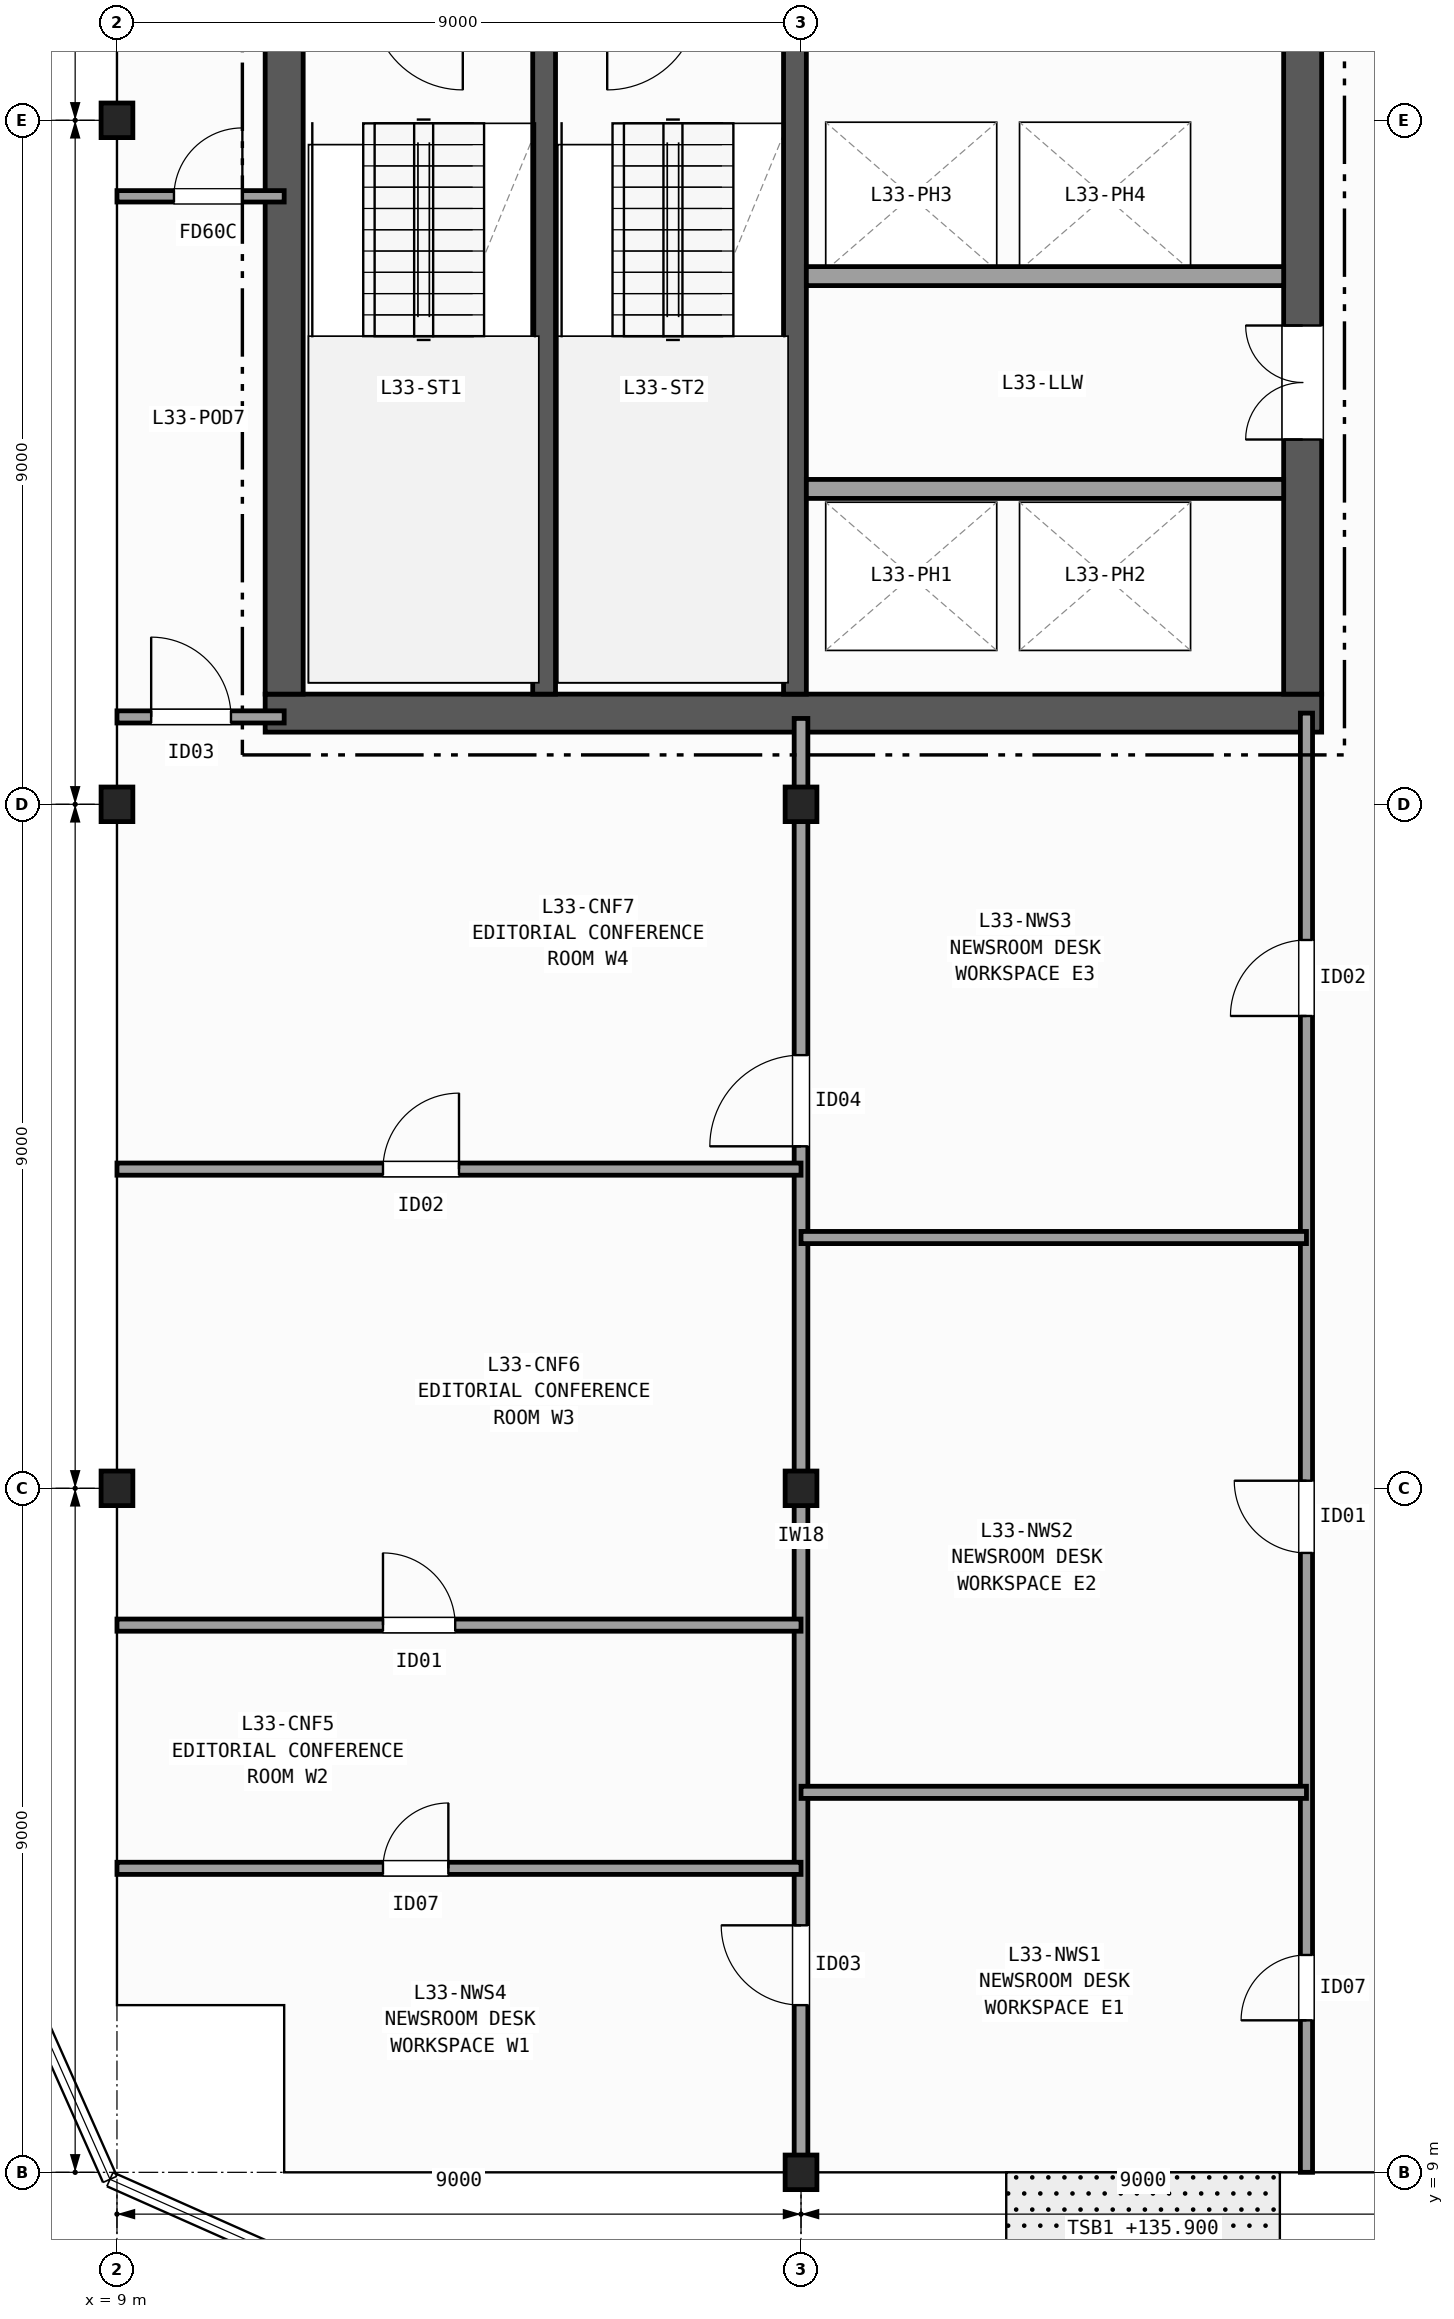
"""IFC4 building model, lengths in metres.
Left out: names, types, materials, properties, quantities, classifications, styles, units other than length and angle.
Written with IfcOpenShell. Run it as: python <this file> out.ifc"""

import sys

from ifc_helpers import new_model, si_unit, direction, frame, frame_2d, origin, origin_2d, place, context, subcontext, project, spatial, rectangle, i_section, extrude, element, fill, save


model = new_model("IFC4")
c1 = context("Model", 3, precision=1e-05, world=origin(), true_north=direction((0.0, 1.0)))
c2 = subcontext(c1, "Body", "Model", "MODEL_VIEW")
j1 = project(units=[si_unit("LENGTHUNIT", "METRE"), si_unit("PLANEANGLEUNIT", "RADIAN")], contexts=[c1])
p1 = place(None, origin())
s1 = spatial("IfcSite", under=j1, at=p1, CompositionType="ELEMENT")
p2 = place(p1, origin())
s2 = spatial("IfcBuilding", under=s1, at=p2, CompositionType="ELEMENT")
p3 = place(p2, frame((0.0, 0.0, 135.9)))
s3 = spatial("IfcBuildingStorey", under=s2, at=p3, CompositionType="ELEMENT", Elevation=135.9)
for number, where, z_axis, x_axis in (
    (1, (9.0, 18.0, 0.0), (0.0, 0.0, 1.0), (1.0, 0.0, 0.0)),
    (2, (9.0, 27.0, 0.0), (0.0, 0.0, 1.0), (1.0, 0.0, 0.0)),
    (3, (9.0, 36.0, 0.0), (0.0, 0.0, 1.0), (1.0, 0.0, 0.0)),
    (4, (18.0, 9.0, 0.0), (0.0, 0.0, 1.0), (1.0, 0.0, 0.0)),
    (5, (18.0, 18.0, 0.0), (0.0, 0.0, 1.0), (1.0, 0.0, 0.0)),
    (6, (18.0, 27.0, 0.0), (0.0, 0.0, 1.0), (1.0, 0.0, 0.0)),
):
    element("IfcColumn", number, at=place(p3, frame(where, z_axis=z_axis, x_axis=x_axis)), inside=s3, PredefinedType="COLUMN", context=c2, shape_type="SweptSolid", body=[
        extrude(i_section(OverallWidth=0.418, OverallDepth=0.455, WebThickness=0.042, FlangeThickness=0.068, FilletRadius=0.015, at=origin_2d()), origin(), (0.0, 0.0, 1.0), 3.7),
    ])
p4 = place(p3, frame((10.95, 28.2, 0.0), z_axis=(0.0, 0.0, 1.0), x_axis=(1.0, 0.0, 0.0)))
e7 = element("IfcWall", 7, at=p4, inside=s3, PredefinedType="SHEAR", context=c2, shape_type="SweptSolid", body=[
    extrude(rectangle(XDim=13.9, YDim=0.5, at=frame_2d((6.95, 0.0))), origin(), (0.0, 0.0, 1.0), 3.42),
])
p5 = place(p3, frame((11.2, 42.15, 0.0), z_axis=(0.0, 0.0, 1.0), x_axis=(0.0, -1.0, 0.0)))
e8 = element("IfcWall", 8, at=p5, inside=s3, PredefinedType="SHEAR", context=c2, shape_type="SweptSolid", body=[
    extrude(rectangle(XDim=13.7, YDim=0.5, at=frame_2d((6.85, 0.0))), origin(), (0.0, 0.0, 1.0), 3.42),
])
p6 = place(p3, frame((24.6, 28.45, 0.0), z_axis=(0.0, 0.0, 1.0), x_axis=(0.0, 1.0, 0.0)))
e9 = element("IfcWall", 9, at=p6, inside=s3, PredefinedType="SHEAR", context=c2, shape_type="SweptSolid", body=[
    extrude(rectangle(XDim=13.7, YDim=0.5, at=frame_2d((6.85, 0.0))), origin(), (0.0, 0.0, 1.0), 3.42),
])
p7 = place(p6, frame((3.35, 0.0, 0.0)))
e10 = element("IfcOpeningElement", 10, at=p7, cuts=e9, PredefinedType="OPENING", context=c2, shape_type="SweptSolid", body=[
    extrude(rectangle(XDim=1.5, YDim=2.2, at=frame_2d((0.75, 1.1))), frame((0.0, 0.26, 0.0), z_axis=(0.0, -1.0, 0.0), x_axis=(1.0, 0.0, 0.0)), (0.0, 0.0, 1.0), 0.52),
])
p8 = place(p6, frame((9.95, 0.0, 0.0)))
e11 = element("IfcOpeningElement", 11, at=p8, cuts=e9, PredefinedType="OPENING", context=c2, shape_type="SweptSolid", body=[
    extrude(rectangle(XDim=0.9, YDim=2.1, at=frame_2d((0.45, 1.05))), frame((0.0, 0.26, 0.0), z_axis=(0.0, -1.0, 0.0), x_axis=(1.0, 0.0, 0.0)), (0.0, 0.0, 1.0), 0.52),
])
p9 = place(p3, frame((14.62, 28.45, 0.0), z_axis=(0.0, 0.0, 1.0), x_axis=(0.0, 1.0, 0.0)))
e12 = element("IfcWall", 12, at=p9, inside=s3, PredefinedType="SHEAR", context=c2, shape_type="SweptSolid", body=[
    extrude(rectangle(XDim=9.0, YDim=0.3, at=frame_2d((4.5, 0.0))), origin(), (0.0, 0.0, 1.0), 3.42),
])
p10 = place(p3, frame((17.92, 42.15, 0.0), z_axis=(0.0, 0.0, 1.0), x_axis=(0.0, -1.0, 0.0)))
e13 = element("IfcWall", 13, at=p10, inside=s3, PredefinedType="SHEAR", context=c2, shape_type="SweptSolid", body=[
    extrude(rectangle(XDim=13.7, YDim=0.3, at=frame_2d((6.85, 0.0))), origin(), (0.0, 0.0, 1.0), 3.42),
])
p11 = place(p10, frame((1.975, 0.0, 0.0)))
e14 = element("IfcOpeningElement", 14, at=p11, cuts=e13, PredefinedType="OPENING", context=c2, shape_type="SweptSolid", body=[
    extrude(rectangle(XDim=1.15, YDim=2.15, at=frame_2d((0.575, 1.075))), frame((0.0, 0.16, 0.0), z_axis=(0.0, -1.0, 0.0), x_axis=(1.0, 0.0, 0.0)), (0.0, 0.0, 1.0), 0.32),
])
for number, where, z_axis, x_axis in (
    (15, (18.07, 31.15, 0.0), (0.0, 0.0, 1.0), (1.0, 0.0, 0.0)),
    (16, (24.35, 33.95, 0.0), (0.0, 0.0, 1.0), (-1.0, 0.0, 0.0)),
):
    element("IfcWall", number, at=place(p3, frame(where, z_axis=z_axis, x_axis=x_axis)), inside=s3, PredefinedType="PARTITIONING", context=c2, shape_type="SweptSolid", body=[
        extrude(rectangle(XDim=6.28, YDim=0.25, at=frame_2d((3.14, 0.0))), origin(), (0.0, 0.0, 1.0), 3.42),
    ])
p12 = place(p3, frame((9.0, 28.15, 0.0), z_axis=(0.0, 0.0, 1.0), x_axis=(1.0, 0.0, 0.0)))
e17 = element("IfcWall", 17, at=p12, inside=s3, PredefinedType="PARTITIONING", context=c2, shape_type="SweptSolid", body=[
    extrude(rectangle(XDim=2.2, YDim=0.16, at=frame_2d((1.1, 0.0))), origin(), (0.0, 0.0, 1.0), 2.634),
])
p13 = place(p12, frame((0.45, 0.0, 0.0)))
e18 = element("IfcOpeningElement", 18, at=p13, cuts=e17, PredefinedType="OPENING", context=c2, shape_type="SweptSolid", body=[
    extrude(rectangle(XDim=1.05, YDim=2.15, at=frame_2d((0.525, 1.075))), frame((0.0, 0.09, 0.0), z_axis=(0.0, -1.0, 0.0), x_axis=(1.0, 0.0, 0.0)), (0.0, 0.0, 1.0), 0.18),
])
p14 = place(p3, frame((9.0, 35.0, 0.0), z_axis=(0.0, 0.0, 1.0), x_axis=(1.0, 0.0, 0.0)))
e19 = element("IfcWall", 19, at=p14, inside=s3, PredefinedType="PARTITIONING", context=c2, shape_type="SweptSolid", body=[
    extrude(rectangle(XDim=2.2, YDim=0.15, at=frame_2d((1.1, 0.0))), origin(), (0.0, 0.0, 1.0), 2.634),
])
p15 = place(p14, frame((0.75, 0.0, 0.0)))
e20 = element("IfcOpeningElement", 20, at=p15, cuts=e19, PredefinedType="OPENING", context=c2, shape_type="SweptSolid", body=[
    extrude(rectangle(XDim=0.9, YDim=2.1, at=frame_2d((0.45, 1.05))), frame((0.0, 0.085, 0.0), z_axis=(0.0, -1.0, 0.0), x_axis=(1.0, 0.0, 0.0)), (0.0, 0.0, 1.0), 0.17),
])
p16 = place(p3, frame((24.65, 9.0, 0.0), z_axis=(0.0, 0.0, 1.0), x_axis=(0.0, 1.0, 0.0)))
e21 = element("IfcWall", 21, at=p16, inside=s3, PredefinedType="PARTITIONING", context=c2, shape_type="SweptSolid", body=[
    extrude(rectangle(XDim=19.2, YDim=0.16, at=frame_2d((9.6, 0.0))), origin(), (0.0, 0.0, 1.0), 2.634),
])
p17 = place(p16, frame((2.0, 0.0, 0.0)))
e22 = element("IfcOpeningElement", 22, at=p17, cuts=e21, PredefinedType="OPENING", context=c2, shape_type="SweptSolid", body=[
    extrude(rectangle(XDim=0.86, YDim=2.05, at=frame_2d((0.43, 1.025))), frame((0.0, 0.09, 0.0), z_axis=(0.0, -1.0, 0.0), x_axis=(1.0, 0.0, 0.0)), (0.0, 0.0, 1.0), 0.18),
])
p18 = place(p16, frame((8.15, 0.0, 0.0)))
e23 = element("IfcOpeningElement", 23, at=p18, cuts=e21, PredefinedType="OPENING", context=c2, shape_type="SweptSolid", body=[
    extrude(rectangle(XDim=0.95, YDim=2.1, at=frame_2d((0.475, 1.05))), frame((0.0, 0.09, 0.0), z_axis=(0.0, -1.0, 0.0), x_axis=(1.0, 0.0, 0.0)), (0.0, 0.0, 1.0), 0.18),
])
p19 = place(p16, frame((15.215, 0.0, 0.0)))
e24 = element("IfcOpeningElement", 24, at=p19, cuts=e21, PredefinedType="OPENING", context=c2, shape_type="SweptSolid", body=[
    extrude(rectangle(XDim=1.0, YDim=2.1, at=frame_2d((0.5, 1.05))), frame((0.0, 0.09, 0.0), z_axis=(0.0, -1.0, 0.0), x_axis=(1.0, 0.0, 0.0)), (0.0, 0.0, 1.0), 0.18),
])
p20 = place(p3, frame((18.0, 9.0, 0.0), z_axis=(0.0, 0.0, 1.0), x_axis=(0.0, 1.0, 0.0)))
e25 = element("IfcWall", 25, at=p20, inside=s3, PredefinedType="PARTITIONING", context=c2, shape_type="SweptSolid", body=[
    extrude(rectangle(XDim=19.13, YDim=0.18, at=frame_2d((9.565, 0.0))), origin(), (0.0, 0.0, 1.0), 2.634),
])
p21 = place(p20, frame((2.2, 0.0, 0.0)))
e26 = element("IfcOpeningElement", 26, at=p21, cuts=e25, PredefinedType="OPENING", context=c2, shape_type="SweptSolid", body=[
    extrude(rectangle(XDim=1.05, YDim=2.15, at=frame_2d((0.525, 1.075))), frame((0.0, 0.1, 0.0), z_axis=(0.0, -1.0, 0.0), x_axis=(1.0, 0.0, 0.0)), (0.0, 0.0, 1.0), 0.2),
])
p22 = place(p20, frame((13.5, 0.0, 0.0)))
e27 = element("IfcOpeningElement", 27, at=p22, cuts=e25, PredefinedType="OPENING", context=c2, shape_type="SweptSolid", body=[
    extrude(rectangle(XDim=1.2, YDim=2.15, at=frame_2d((0.6, 1.075))), frame((0.0, 0.1, 0.0), z_axis=(0.0, -1.0, 0.0), x_axis=(1.0, 0.0, 0.0)), (0.0, 0.0, 1.0), 0.2),
])
p23 = place(p3, frame((18.0, 14.0, 0.0), z_axis=(0.0, 0.0, 1.0), x_axis=(1.0, 0.0, 0.0)))
e28 = element("IfcWall", 28, at=p23, inside=s3, PredefinedType="PARTITIONING", context=c2, shape_type="SweptSolid", body=[
    extrude(rectangle(XDim=6.65, YDim=0.16, at=frame_2d((3.325, 0.0))), origin(), (0.0, 0.0, 1.0), 2.789),
])
p24 = place(p3, frame((18.0, 21.3, 0.0), z_axis=(0.0, 0.0, 1.0), x_axis=(1.0, 0.0, 0.0)))
e29 = element("IfcWall", 29, at=p24, inside=s3, PredefinedType="PARTITIONING", context=c2, shape_type="SweptSolid", body=[
    extrude(rectangle(XDim=6.65, YDim=0.16, at=frame_2d((3.325, 0.0))), origin(), (0.0, 0.0, 1.0), 2.792),
])
p25 = place(p3, frame((9.0, 13.0, 0.0), z_axis=(0.0, 0.0, 1.0), x_axis=(1.0, 0.0, 0.0)))
e30 = element("IfcWall", 30, at=p25, inside=s3, PredefinedType="PARTITIONING", context=c2, shape_type="SweptSolid", body=[
    extrude(rectangle(XDim=9.0, YDim=0.16, at=frame_2d((4.5, 0.0))), origin(), (0.0, 0.0, 1.0), 2.792),
])
p26 = place(p25, frame((3.5, 0.0, 0.0)))
e31 = element("IfcOpeningElement", 31, at=p26, cuts=e30, PredefinedType="OPENING", context=c2, shape_type="SweptSolid", body=[
    extrude(rectangle(XDim=0.86, YDim=2.05, at=frame_2d((0.43, 1.025))), frame((0.0, 0.09, 0.0), z_axis=(0.0, -1.0, 0.0), x_axis=(1.0, 0.0, 0.0)), (0.0, 0.0, 1.0), 0.18),
])
p27 = place(p3, frame((9.0, 16.2, 0.0), z_axis=(0.0, 0.0, 1.0), x_axis=(1.0, 0.0, 0.0)))
e32 = element("IfcWall", 32, at=p27, inside=s3, PredefinedType="PARTITIONING", context=c2, shape_type="SweptSolid", body=[
    extrude(rectangle(XDim=9.0, YDim=0.16, at=frame_2d((4.5, 0.0))), origin(), (0.0, 0.0, 1.0), 2.792),
])
p28 = place(p27, frame((3.5, 0.0, 0.0)))
e33 = element("IfcOpeningElement", 33, at=p28, cuts=e32, PredefinedType="OPENING", context=c2, shape_type="SweptSolid", body=[
    extrude(rectangle(XDim=0.95, YDim=2.1, at=frame_2d((0.475, 1.05))), frame((0.0, 0.09, 0.0), z_axis=(0.0, -1.0, 0.0), x_axis=(1.0, 0.0, 0.0)), (0.0, 0.0, 1.0), 0.18),
])
p29 = place(p3, frame((9.0, 22.2, 0.0), z_axis=(0.0, 0.0, 1.0), x_axis=(1.0, 0.0, 0.0)))
e34 = element("IfcWall", 34, at=p29, inside=s3, PredefinedType="PARTITIONING", context=c2, shape_type="SweptSolid", body=[
    extrude(rectangle(XDim=9.0, YDim=0.16, at=frame_2d((4.5, 0.0))), origin(), (0.0, 0.0, 1.0), 2.634),
])
p30 = place(p29, frame((3.5, 0.0, 0.0)))
e35 = element("IfcOpeningElement", 35, at=p30, cuts=e34, PredefinedType="OPENING", context=c2, shape_type="SweptSolid", body=[
    extrude(rectangle(XDim=1.0, YDim=2.1, at=frame_2d((0.5, 1.05))), frame((0.0, 0.09, 0.0), z_axis=(0.0, -1.0, 0.0), x_axis=(1.0, 0.0, 0.0)), (0.0, 0.0, 1.0), 0.18),
])
p31 = place(p7, origin())
e36 = element("IfcDoor", 36, at=p31, inside=s3, OperationType="DOUBLE_DOOR_SINGLE_SWING", PredefinedType="DOOR", context=c2, shape_type="SweptSolid", body=[
    extrude(rectangle(XDim=1.5, YDim=2.2, at=frame_2d((0.75, 1.1))), frame((0.0, 0.025, 0.0), z_axis=(0.0, -1.0, 0.0), x_axis=(1.0, 0.0, 0.0)), (0.0, 0.0, 1.0), 0.05),
])
fill(e10, e36)
p32 = place(p13, origin())
e37 = element("IfcDoor", 37, at=p32, inside=s3, OperationType="SINGLE_SWING_LEFT", PredefinedType="DOOR", context=c2, shape_type="SweptSolid", body=[
    extrude(rectangle(XDim=1.05, YDim=2.15, at=frame_2d((0.525, 1.075))), frame((0.0, 0.025, 0.0), z_axis=(0.0, -1.0, 0.0), x_axis=(1.0, 0.0, 0.0)), (0.0, 0.0, 1.0), 0.05),
])
fill(e18, e37)
p33 = place(p15, origin())
e38 = element("IfcDoor", 38, at=p33, inside=s3, OperationType="SINGLE_SWING_RIGHT", PredefinedType="DOOR", context=c2, shape_type="SweptSolid", body=[
    extrude(rectangle(XDim=0.9, YDim=2.1, at=frame_2d((0.45, 1.05))), frame((0.0, 0.025, 0.0), z_axis=(0.0, -1.0, 0.0), x_axis=(1.0, 0.0, 0.0)), (0.0, 0.0, 1.0), 0.05),
])
fill(e20, e38)
p34 = place(p17, origin())
e39 = element("IfcDoor", 39, at=p34, inside=s3, OperationType="SINGLE_SWING_LEFT", PredefinedType="DOOR", context=c2, shape_type="SweptSolid", body=[
    extrude(rectangle(XDim=0.86, YDim=2.05, at=frame_2d((0.43, 1.025))), frame((0.0, 0.025, 0.0), z_axis=(0.0, -1.0, 0.0), x_axis=(1.0, 0.0, 0.0)), (0.0, 0.0, 1.0), 0.05),
])
fill(e22, e39)
p35 = place(p18, origin())
e40 = element("IfcDoor", 40, at=p35, inside=s3, OperationType="SINGLE_SWING_RIGHT", PredefinedType="DOOR", context=c2, shape_type="SweptSolid", body=[
    extrude(rectangle(XDim=0.95, YDim=2.1, at=frame_2d((0.475, 1.05))), frame((0.0, 0.025, 0.0), z_axis=(0.0, -1.0, 0.0), x_axis=(1.0, 0.0, 0.0)), (0.0, 0.0, 1.0), 0.05),
])
fill(e23, e40)
p36 = place(p19, origin())
e41 = element("IfcDoor", 41, at=p36, inside=s3, OperationType="SINGLE_SWING_LEFT", PredefinedType="DOOR", context=c2, shape_type="SweptSolid", body=[
    extrude(rectangle(XDim=1.0, YDim=2.1, at=frame_2d((0.5, 1.05))), frame((0.0, 0.025, 0.0), z_axis=(0.0, -1.0, 0.0), x_axis=(1.0, 0.0, 0.0)), (0.0, 0.0, 1.0), 0.05),
])
fill(e24, e41)
p37 = place(p21, origin())
e42 = element("IfcDoor", 42, at=p37, inside=s3, OperationType="SINGLE_SWING_RIGHT", PredefinedType="DOOR", context=c2, shape_type="SweptSolid", body=[
    extrude(rectangle(XDim=1.05, YDim=2.15, at=frame_2d((0.525, 1.075))), frame((0.0, 0.025, 0.0), z_axis=(0.0, -1.0, 0.0), x_axis=(1.0, 0.0, 0.0)), (0.0, 0.0, 1.0), 0.05),
])
fill(e26, e42)
p38 = place(p22, origin())
e43 = element("IfcDoor", 43, at=p38, inside=s3, OperationType="SINGLE_SWING_LEFT", PredefinedType="DOOR", context=c2, shape_type="SweptSolid", body=[
    extrude(rectangle(XDim=1.2, YDim=2.15, at=frame_2d((0.6, 1.075))), frame((0.0, 0.025, 0.0), z_axis=(0.0, -1.0, 0.0), x_axis=(1.0, 0.0, 0.0)), (0.0, 0.0, 1.0), 0.05),
])
fill(e27, e43)
p39 = place(p26, origin())
e44 = element("IfcDoor", 44, at=p39, inside=s3, OperationType="SINGLE_SWING_RIGHT", PredefinedType="DOOR", context=c2, shape_type="SweptSolid", body=[
    extrude(rectangle(XDim=0.86, YDim=2.05, at=frame_2d((0.43, 1.025))), frame((0.0, 0.025, 0.0), z_axis=(0.0, -1.0, 0.0), x_axis=(1.0, 0.0, 0.0)), (0.0, 0.0, 1.0), 0.05),
])
fill(e31, e44)
p40 = place(p28, origin())
e45 = element("IfcDoor", 45, at=p40, inside=s3, OperationType="SINGLE_SWING_LEFT", PredefinedType="DOOR", context=c2, shape_type="SweptSolid", body=[
    extrude(rectangle(XDim=0.95, YDim=2.1, at=frame_2d((0.475, 1.05))), frame((0.0, 0.025, 0.0), z_axis=(0.0, -1.0, 0.0), x_axis=(1.0, 0.0, 0.0)), (0.0, 0.0, 1.0), 0.05),
])
fill(e33, e45)
p41 = place(p30, origin())
e46 = element("IfcDoor", 46, at=p41, inside=s3, OperationType="SINGLE_SWING_RIGHT", PredefinedType="DOOR", context=c2, shape_type="SweptSolid", body=[
    extrude(rectangle(XDim=1.0, YDim=2.1, at=frame_2d((0.5, 1.05))), frame((0.0, 0.025, 0.0), z_axis=(0.0, -1.0, 0.0), x_axis=(1.0, 0.0, 0.0)), (0.0, 0.0, 1.0), 0.05),
])
fill(e35, e46)
save(model, sys.argv[1])
